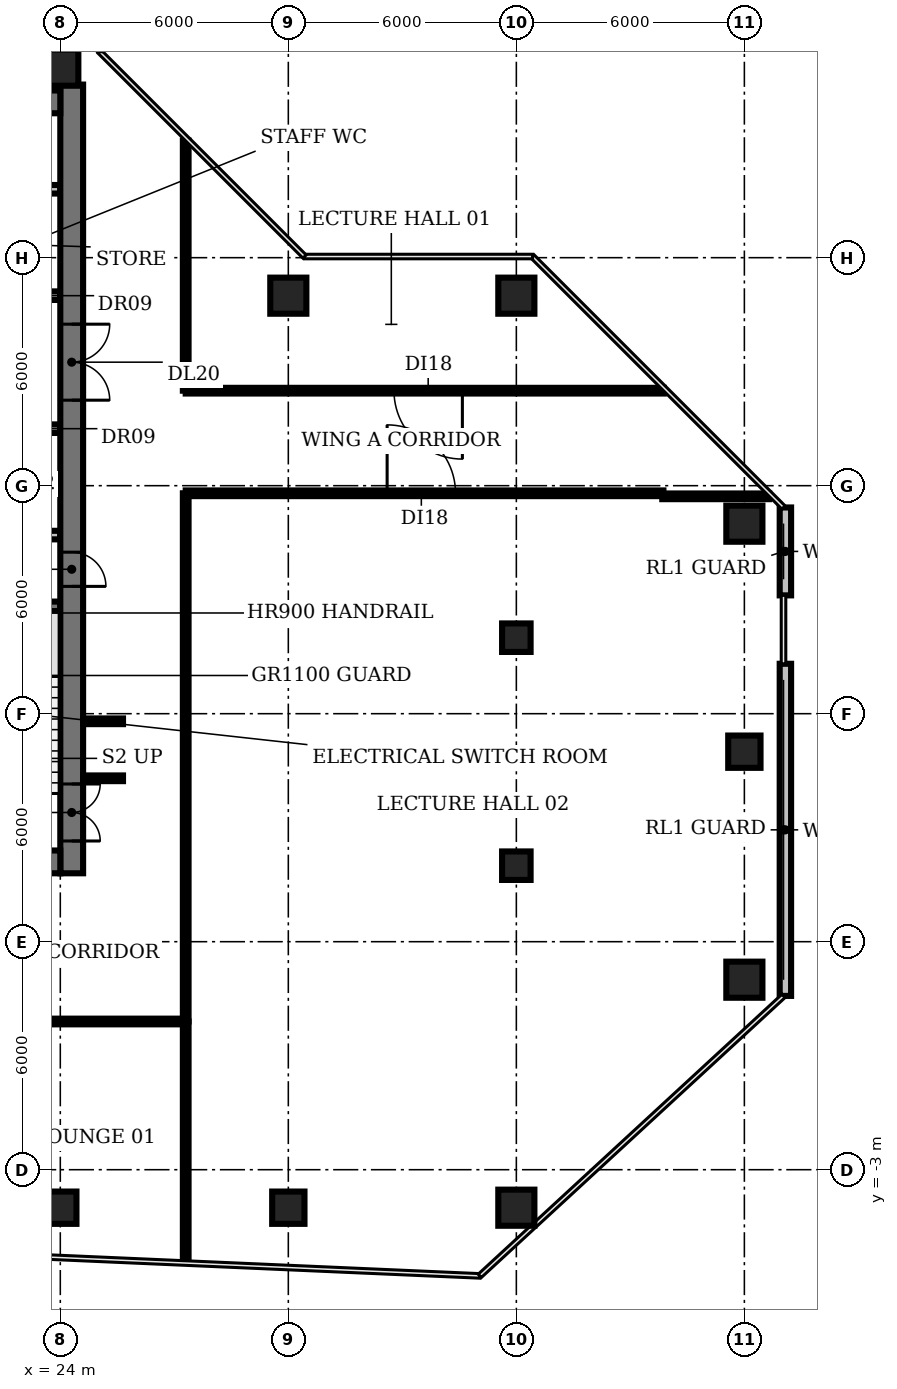
"""IFC4 building model, lengths in metres.
Left out: names, types, materials, properties, quantities, classifications, styles, units other than length and angle.
Written with IfcOpenShell. Run it as: python <this file> out.ifc"""

import sys

from ifc_helpers import new_model, si_unit, direction, frame, frame_2d, origin, origin_2d, place, context, subcontext, project, spatial, rectangle, circle, extrude, element, fill, save


model = new_model("IFC4")
c1 = context("Model", 3, precision=1e-05, world=origin(), true_north=direction((0.0, 1.0)))
c2 = subcontext(c1, "Body", "Model", "MODEL_VIEW")
j1 = project(units=[si_unit("LENGTHUNIT", "METRE"), si_unit("PLANEANGLEUNIT", "RADIAN")], contexts=[c1])
p1 = place(None, origin())
s1 = spatial("IfcSite", under=j1, at=p1, CompositionType="ELEMENT")
p2 = place(p1, origin())
s2 = spatial("IfcBuilding", under=s1, at=p2, CompositionType="ELEMENT")
p3 = place(p2, frame((0.0, 0.0, 159.2)))
s3 = spatial("IfcBuildingStorey", under=s2, at=p3, CompositionType="ELEMENT", Elevation=159.2)
p4 = place(p3, frame((24.0, -4.0, 0.0), z_axis=(0.0, 0.0, 1.0), x_axis=(1.0, 0.0, 0.0)))
e1 = element("IfcColumn", 1, at=p4, inside=s3, PredefinedType="COLUMN", context=c2, shape_type="SweptSolid", body=[
    extrude(rectangle(XDim=0.85, YDim=0.85, at=origin_2d()), origin(), (0.0, 0.0, 1.0), 3.85),
])
p5 = place(p3, frame((24.0, 26.0, 0.0), z_axis=(0.0, 0.0, 1.0), x_axis=(1.0, 0.0, 0.0)))
e2 = element("IfcColumn", 2, at=p5, inside=s3, PredefinedType="COLUMN", context=c2, shape_type="SweptSolid", body=[
    extrude(circle(Radius=0.475, at=origin_2d()), origin(), (0.0, 0.0, 1.0), 3.85),
])
p6 = place(p3, frame((30.0, -4.0, 0.0), z_axis=(0.0, 0.0, 1.0), x_axis=(1.0, 0.0, 0.0)))
e3 = element("IfcColumn", 3, at=p6, inside=s3, PredefinedType="COLUMN", context=c2, shape_type="SweptSolid", body=[
    extrude(rectangle(XDim=0.85, YDim=0.85, at=origin_2d()), origin(), (0.0, 0.0, 1.0), 3.85),
])
for number, where, z_axis, x_axis in (
    (4, (30.0, 20.0, 0.0), (0.0, 0.0, 1.0), (1.0, 0.0, 0.0)),
    (5, (36.0, -4.0, 0.0), (0.0, 0.0, 1.0), (1.0, 0.0, 0.0)),
):
    element("IfcColumn", number, at=place(p3, frame(where, z_axis=z_axis, x_axis=x_axis)), inside=s3, PredefinedType="COLUMN", context=c2, shape_type="SweptSolid", body=[
        extrude(circle(Radius=0.475, at=origin_2d()), origin(), (0.0, 0.0, 1.0), 3.85),
    ])
for number, where, z_axis, x_axis in (
    (6, (36.0, 5.0, 0.0), (0.0, 0.0, 1.0), (1.0, 0.0, 0.0)),
    (7, (36.0, 11.0, 0.0), (0.0, 0.0, 1.0), (1.0, 0.0, 0.0)),
):
    element("IfcColumn", number, at=place(p3, frame(where, z_axis=z_axis, x_axis=x_axis)), inside=s3, PredefinedType="COLUMN", context=c2, shape_type="SweptSolid", body=[
        extrude(rectangle(XDim=0.75, YDim=0.75, at=origin_2d()), origin(), (0.0, 0.0, 1.0), 3.85),
    ])
for number, where, z_axis, x_axis in (
    (8, (36.0, 20.0, 0.0), (0.0, 0.0, 1.0), (1.0, 0.0, 0.0)),
    (9, (42.0, 2.0, 0.0), (0.0, 0.0, 1.0), (1.0, 0.0, 0.0)),
):
    element("IfcColumn", number, at=place(p3, frame(where, z_axis=z_axis, x_axis=x_axis)), inside=s3, PredefinedType="COLUMN", context=c2, shape_type="SweptSolid", body=[
        extrude(circle(Radius=0.475, at=origin_2d()), origin(), (0.0, 0.0, 1.0), 3.85),
    ])
p7 = place(p3, frame((42.0, 8.0, 0.0), z_axis=(0.0, 0.0, 1.0), x_axis=(1.0, 0.0, 0.0)))
e10 = element("IfcColumn", 10, at=p7, inside=s3, PredefinedType="COLUMN", context=c2, shape_type="SweptSolid", body=[
    extrude(rectangle(XDim=0.85, YDim=0.85, at=origin_2d()), origin(), (0.0, 0.0, 1.0), 3.85),
])
p8 = place(p3, frame((42.0, 14.0, 0.0), z_axis=(0.0, 0.0, 1.0), x_axis=(1.0, 0.0, 0.0)))
e11 = element("IfcColumn", 11, at=p8, inside=s3, PredefinedType="COLUMN", context=c2, shape_type="SweptSolid", body=[
    extrude(circle(Radius=0.475, at=origin_2d()), origin(), (0.0, 0.0, 1.0), 3.85),
])
p9 = place(p3, frame((43.08, 1.573, 0.0), z_axis=(0.0, 0.0, 1.0), x_axis=(0.0, 1.0, 0.0)))
e12 = element("IfcWall", 12, at=p9, inside=s3, PredefinedType="SOLIDWALL", context=c2, shape_type="SweptSolid", body=[
    extrude(rectangle(XDim=8.74, YDim=0.3, at=frame_2d((4.37, 0.0))), origin(), (0.0, 0.0, 1.0), 3.85),
])
p10 = place(p3, frame((43.08, 12.113, 0.0), z_axis=(0.0, 0.0, 1.0), x_axis=(0.0, 1.0, 0.0)))
e13 = element("IfcWall", 13, at=p10, inside=s3, PredefinedType="SOLIDWALL", context=c2, shape_type="SweptSolid", body=[
    extrude(rectangle(XDim=2.313, YDim=0.3, at=frame_2d((1.157, 0.0))), origin(), (0.0, 0.0, 1.0), 3.85),
])
p11 = place(p3, frame((20.85, 11.825, 0.0), z_axis=(0.0, 0.0, 1.0), x_axis=(1.0, 0.0, 0.0)))
e14 = element("IfcWall", 14, at=p11, inside=s3, PredefinedType="SHEAR", context=c2, shape_type="SweptSolid", body=[
    extrude(rectangle(XDim=3.15, YDim=0.25, at=frame_2d((1.575, 0.0))), origin(), (0.0, 0.0, 1.0), 3.85),
])
p12 = place(p3, frame((16.6, 13.7, 0.0), z_axis=(0.0, 0.0, 1.0), x_axis=(1.0, 0.0, 0.0)))
e15 = element("IfcWall", 15, at=p12, inside=s3, PredefinedType="PARTITIONING", context=c2, shape_type="SweptSolid", body=[
    extrude(rectangle(XDim=7.4, YDim=0.225, at=frame_2d((3.7, 0.0))), origin(), (0.0, 0.0, 1.0), 3.85),
])
p13 = place(p3, frame((9.4, 16.5, 0.0), z_axis=(0.0, 0.0, 1.0), x_axis=(1.0, 0.0, 0.0)))
e16 = element("IfcWall", 16, at=p13, inside=s3, PredefinedType="PARTITIONING", context=c2, shape_type="SweptSolid", body=[
    extrude(rectangle(XDim=14.6, YDim=0.225, at=frame_2d((7.3, 0.0))), origin(), (0.0, 0.0, 1.0), 3.85),
])
p14 = place(p13, frame((0.85, 0.0, 0.0)))
e17 = element("IfcOpeningElement", 17, at=p14, cuts=e16, PredefinedType="OPENING", context=c2, shape_type="SweptSolid", body=[
    extrude(rectangle(XDim=0.9, YDim=2.1, at=frame_2d((0.45, 1.05))), frame((0.0, 0.123, 0.0), z_axis=(0.0, -1.0, 0.0), x_axis=(1.0, 0.0, 0.0)), (0.0, 0.0, 1.0), 0.245),
])
p15 = place(p13, frame((3.625, 0.0, 0.0)))
e18 = element("IfcOpeningElement", 18, at=p15, cuts=e16, PredefinedType="OPENING", context=c2, shape_type="SweptSolid", body=[
    extrude(rectangle(XDim=0.9, YDim=2.1, at=frame_2d((0.45, 1.05))), frame((0.0, 0.123, 0.0), z_axis=(0.0, -1.0, 0.0), x_axis=(1.0, 0.0, 0.0)), (0.0, 0.0, 1.0), 0.245),
])
p16 = place(p13, frame((7.775, 0.0, 0.0)))
e19 = element("IfcOpeningElement", 19, at=p16, cuts=e16, PredefinedType="OPENING", context=c2, shape_type="SweptSolid", body=[
    extrude(rectangle(XDim=1.0, YDim=2.1, at=frame_2d((0.5, 1.05))), frame((0.0, 0.123, 0.0), z_axis=(0.0, -1.0, 0.0), x_axis=(1.0, 0.0, 0.0)), (0.0, 0.0, 1.0), 0.245),
])
p17 = place(p13, frame((11.647, 0.0, 0.0)))
e20 = element("IfcOpeningElement", 20, at=p17, cuts=e16, PredefinedType="OPENING", context=c2, shape_type="SweptSolid", body=[
    extrude(rectangle(XDim=0.9, YDim=2.1, at=frame_2d((0.45, 1.05))), frame((0.0, 0.123, 0.0), z_axis=(0.0, -1.0, 0.0), x_axis=(1.0, 0.0, 0.0)), (0.0, 0.0, 1.0), 0.245),
])
p18 = place(p13, frame((13.423, 0.0, 0.0)))
e21 = element("IfcOpeningElement", 21, at=p18, cuts=e16, PredefinedType="OPENING", context=c2, shape_type="SweptSolid", body=[
    extrude(rectangle(XDim=0.9, YDim=2.1, at=frame_2d((0.45, 1.05))), frame((0.0, 0.123, 0.0), z_axis=(0.0, -1.0, 0.0), x_axis=(1.0, 0.0, 0.0)), (0.0, 0.0, 1.0), 0.245),
])
p19 = place(p3, frame((24.0, 20.0, 0.0), z_axis=(0.0, 0.0, 1.0), x_axis=(-1.0, 0.0, 0.0)))
e22 = element("IfcWall", 22, at=p19, inside=s3, PredefinedType="PARTITIONING", context=c2, shape_type="SweptSolid", body=[
    extrude(rectangle(XDim=14.6, YDim=0.225, at=frame_2d((7.3, 0.0))), origin(), (0.0, 0.0, 1.0), 3.85),
])
p20 = place(p19, frame((12.75, 0.0, 0.0)))
e23 = element("IfcOpeningElement", 23, at=p20, cuts=e22, PredefinedType="OPENING", context=c2, shape_type="SweptSolid", body=[
    extrude(rectangle(XDim=1.1, YDim=2.1, at=frame_2d((0.55, 1.05))), frame((0.0, 0.123, 0.0), z_axis=(0.0, -1.0, 0.0), x_axis=(1.0, 0.0, 0.0)), (0.0, 0.0, 1.0), 0.245),
])
p21 = place(p19, frame((9.95, 0.0, 0.0)))
e24 = element("IfcOpeningElement", 24, at=p21, cuts=e22, PredefinedType="OPENING", context=c2, shape_type="SweptSolid", body=[
    extrude(rectangle(XDim=1.1, YDim=2.1, at=frame_2d((0.55, 1.05))), frame((0.0, 0.123, 0.0), z_axis=(0.0, -1.0, 0.0), x_axis=(1.0, 0.0, 0.0)), (0.0, 0.0, 1.0), 0.245),
])
p22 = place(p19, frame((7.15, 0.0, 0.0)))
e25 = element("IfcOpeningElement", 25, at=p22, cuts=e22, PredefinedType="OPENING", context=c2, shape_type="SweptSolid", body=[
    extrude(rectangle(XDim=1.1, YDim=2.1, at=frame_2d((0.55, 1.05))), frame((0.0, 0.123, 0.0), z_axis=(0.0, -1.0, 0.0), x_axis=(1.0, 0.0, 0.0)), (0.0, 0.0, 1.0), 0.245),
])
p23 = place(p19, frame((4.35, 0.0, 0.0)))
e26 = element("IfcOpeningElement", 26, at=p23, cuts=e22, PredefinedType="OPENING", context=c2, shape_type="SweptSolid", body=[
    extrude(rectangle(XDim=1.1, YDim=2.1, at=frame_2d((0.55, 1.05))), frame((0.0, 0.123, 0.0), z_axis=(0.0, -1.0, 0.0), x_axis=(1.0, 0.0, 0.0)), (0.0, 0.0, 1.0), 0.245),
])
p24 = place(p19, frame((2.137, 0.0, 0.0)))
e27 = element("IfcOpeningElement", 27, at=p24, cuts=e22, PredefinedType="OPENING", context=c2, shape_type="SweptSolid", body=[
    extrude(rectangle(XDim=0.9, YDim=2.1, at=frame_2d((0.45, 1.05))), frame((0.0, 0.123, 0.0), z_axis=(0.0, -1.0, 0.0), x_axis=(1.0, 0.0, 0.0)), (0.0, 0.0, 1.0), 0.245),
])
p25 = place(p19, frame((0.363, 0.0, 0.0)))
e28 = element("IfcOpeningElement", 28, at=p25, cuts=e22, PredefinedType="OPENING", context=c2, shape_type="SweptSolid", body=[
    extrude(rectangle(XDim=0.9, YDim=2.1, at=frame_2d((0.45, 1.05))), frame((0.0, 0.123, 0.0), z_axis=(0.0, -1.0, 0.0), x_axis=(1.0, 0.0, 0.0)), (0.0, 0.0, 1.0), 0.245),
])
p26 = place(p3, frame((9.4, 22.8, 0.0), z_axis=(0.0, 0.0, 1.0), x_axis=(1.0, 0.0, 0.0)))
e29 = element("IfcWall", 29, at=p26, inside=s3, PredefinedType="PARTITIONING", context=c2, shape_type="SweptSolid", body=[
    extrude(rectangle(XDim=14.6, YDim=0.225, at=frame_2d((7.3, 0.0))), origin(), (0.0, 0.0, 1.0), 3.85),
])
p27 = place(p3, frame((24.3, 25.555, 0.0), z_axis=(0.0, 0.0, 1.0), x_axis=(0.0, -1.0, 0.0)))
e30 = element("IfcWall", 30, at=p27, inside=s3, PredefinedType="SHEAR", context=c2, shape_type="SweptSolid", body=[
    extrude(rectangle(XDim=20.755, YDim=0.6, at=frame_2d((10.377, 0.0))), origin(), (0.0, 0.0, 1.0), 3.85),
])
p28 = place(p27, frame((18.405, 0.0, 0.0)))
e31 = element("IfcOpeningElement", 31, at=p28, cuts=e30, PredefinedType="OPENING", context=c2, shape_type="SweptSolid", body=[
    extrude(rectangle(XDim=1.5, YDim=2.1, at=frame_2d((0.75, 1.05))), frame((0.0, 0.31, 0.0), z_axis=(0.0, -1.0, 0.0), x_axis=(1.0, 0.0, 0.0)), (0.0, 0.0, 1.0), 0.62),
])
p29 = place(p27, frame((12.305, 0.0, 0.0)))
e32 = element("IfcOpeningElement", 32, at=p29, cuts=e30, PredefinedType="OPENING", context=c2, shape_type="SweptSolid", body=[
    extrude(rectangle(XDim=0.9, YDim=2.1, at=frame_2d((0.45, 1.05))), frame((0.0, 0.31, 0.0), z_axis=(0.0, -1.0, 0.0), x_axis=(1.0, 0.0, 0.0)), (0.0, 0.0, 1.0), 0.62),
])
p30 = place(p27, frame((6.305, 0.0, 0.0)))
e33 = element("IfcOpeningElement", 33, at=p30, cuts=e30, PredefinedType="OPENING", context=c2, shape_type="SweptSolid", body=[
    extrude(rectangle(XDim=2.0, YDim=2.1, at=frame_2d((1.0, 1.05))), frame((0.0, 0.31, 0.0), z_axis=(0.0, -1.0, 0.0), x_axis=(1.0, 0.0, 0.0)), (0.0, 0.0, 1.0), 0.62),
])
p31 = place(p3, frame((24.0, 5.1, 0.0), z_axis=(0.0, 0.0, 1.0), x_axis=(-1.0, 0.0, 0.0)))
e34 = element("IfcWall", 34, at=p31, inside=s3, PredefinedType="SHEAR", context=c2, shape_type="SweptSolid", body=[
    extrude(rectangle(XDim=18.0, YDim=0.6, at=frame_2d((9.0, 0.0))), origin(), (0.0, 0.0, 1.0), 3.85),
])
p32 = place(p31, frame((13.0, 0.0, 0.0)))
e35 = element("IfcOpeningElement", 35, at=p32, cuts=e34, PredefinedType="OPENING", context=c2, shape_type="SweptSolid", body=[
    extrude(rectangle(XDim=1.2, YDim=2.1, at=frame_2d((0.6, 1.05))), frame((0.0, 0.31, 0.0), z_axis=(0.0, -1.0, 0.0), x_axis=(1.0, 0.0, 0.0)), (0.0, 0.0, 1.0), 0.62),
])
p33 = place(p31, frame((4.9, 0.0, 0.0)))
e36 = element("IfcOpeningElement", 36, at=p33, cuts=e34, PredefinedType="OPENING", context=c2, shape_type="SweptSolid", body=[
    extrude(rectangle(XDim=1.0, YDim=2.1, at=frame_2d((0.5, 1.05))), frame((0.0, 0.31, 0.0), z_axis=(0.0, -1.0, 0.0), x_axis=(1.0, 0.0, 0.0)), (0.0, 0.0, 1.0), 0.62),
])
p34 = place(p3, frame((6.0, 25.1, 0.0), z_axis=(0.0, 0.0, 1.0), x_axis=(1.0, 0.0, 0.0)))
e37 = element("IfcWall", 37, at=p34, inside=s3, PredefinedType="SHEAR", context=c2, shape_type="SweptSolid", body=[
    extrude(rectangle(XDim=18.0, YDim=0.6, at=frame_2d((9.0, 0.0))), origin(), (0.0, 0.0, 1.0), 3.85),
])
for number, where, z_axis, x_axis in (
    (38, (24.6, 7.3, 0.0), (0.0, 0.0, 1.0), (1.0, 0.0, 0.0)),
    (39, (24.6, 8.8, 0.0), (0.0, 0.0, 1.0), (1.0, 0.0, 0.0)),
):
    element("IfcWall", number, at=place(p3, frame(where, z_axis=z_axis, x_axis=x_axis)), inside=s3, PredefinedType="PARTITIONING", context=c2, shape_type="SweptSolid", body=[
        extrude(rectangle(XDim=1.05, YDim=0.15, at=frame_2d((0.525, 0.0))), origin(), (0.0, 0.0, 1.0), 2.88),
    ])
p35 = place(p3, frame((27.3, -5.41, 0.0), z_axis=(0.0, 0.0, 1.0), x_axis=(0.0, 1.0, 0.0)))
e40 = element("IfcWall", 40, at=p35, inside=s3, PredefinedType="PARTITIONING", context=c2, shape_type="SweptSolid", body=[
    extrude(rectangle(XDim=6.31, YDim=0.15, at=frame_2d((3.155, 0.0))), origin(), (0.0, 0.0, 1.0), 2.88),
])
p36 = place(p3, frame((27.3, 0.9, 0.0), z_axis=(0.0, 0.0, 1.0), x_axis=(-1.0, 0.0, 0.0)))
e41 = element("IfcWall", 41, at=p36, inside=s3, PredefinedType="PARTITIONING", context=c2, shape_type="SweptSolid", body=[
    extrude(rectangle(XDim=24.6, YDim=0.15, at=frame_2d((12.3, 0.0))), origin(), (0.0, 0.0, 1.0), 2.88),
])
p37 = place(p36, frame((11.8, 0.0, 0.0)))
e42 = element("IfcOpeningElement", 42, at=p37, cuts=e41, PredefinedType="OPENING", context=c2, shape_type="SweptSolid", body=[
    extrude(rectangle(XDim=1.2, YDim=2.1, at=frame_2d((0.6, 1.05))), frame((0.0, 0.085, 0.0), z_axis=(0.0, -1.0, 0.0), x_axis=(1.0, 0.0, 0.0)), (0.0, 0.0, 1.0), 0.17),
])
p38 = place(p3, frame((27.3, 0.9, 0.0), z_axis=(0.0, 0.0, 1.0), x_axis=(0.0, 1.0, 0.0)))
e43 = element("IfcWall", 43, at=p38, inside=s3, PredefinedType="PARTITIONING", context=c2, shape_type="SweptSolid", body=[
    extrude(rectangle(XDim=13.9, YDim=0.15, at=frame_2d((6.95, 0.0))), origin(), (0.0, 0.0, 1.0), 2.88),
])
p39 = place(p3, frame((27.3, 14.8, 0.0), z_axis=(0.0, 0.0, 1.0), x_axis=(1.0, 0.0, 0.0)))
e44 = element("IfcWall", 44, at=p39, inside=s3, PredefinedType="PARTITIONING", context=c2, shape_type="SweptSolid", body=[
    extrude(rectangle(XDim=12.57, YDim=0.15, at=frame_2d((6.285, 0.0))), origin(), (0.0, 0.0, 1.0), 2.88),
])
p40 = place(p39, frame((5.3, 0.0, 0.0)))
e45 = element("IfcOpeningElement", 45, at=p40, cuts=e44, PredefinedType="OPENING", context=c2, shape_type="SweptSolid", body=[
    extrude(rectangle(XDim=1.8, YDim=2.1, at=frame_2d((0.9, 1.05))), frame((0.0, 0.085, 0.0), z_axis=(0.0, -1.0, 0.0), x_axis=(1.0, 0.0, 0.0)), (0.0, 0.0, 1.0), 0.17),
])
p41 = place(p3, frame((27.3, 17.5, 0.0), z_axis=(0.0, 0.0, 1.0), x_axis=(0.0, 1.0, 0.0)))
e46 = element("IfcWall", 46, at=p41, inside=s3, PredefinedType="PARTITIONING", context=c2, shape_type="SweptSolid", body=[
    extrude(rectangle(XDim=6.58, YDim=0.15, at=frame_2d((3.29, 0.0))), origin(), (0.0, 0.0, 1.0), 2.88),
])
p42 = place(p3, frame((39.84, 14.72, 0.0), z_axis=(0.0, 0.0, 1.0), x_axis=(1.0, 0.0, 0.0)))
e47 = element("IfcWall", 47, at=p42, inside=s3, PredefinedType="PARTITIONING", context=c2, shape_type="SweptSolid", body=[
    extrude(rectangle(XDim=2.812, YDim=0.15, at=frame_2d((1.406, 0.0))), origin(), (0.0, 0.0, 1.0), 2.88),
])
p43 = place(p3, frame((39.88, 17.5, 0.0), z_axis=(0.0, 0.0, 1.0), x_axis=(-1.0, 0.0, 0.0)))
e48 = element("IfcWall", 48, at=p43, inside=s3, PredefinedType="PARTITIONING", context=c2, shape_type="SweptSolid", body=[
    extrude(rectangle(XDim=12.58, YDim=0.15, at=frame_2d((6.29, 0.0))), origin(), (0.0, 0.0, 1.0), 2.88),
])
p44 = place(p43, frame((5.3, 0.0, 0.0)))
e49 = element("IfcOpeningElement", 49, at=p44, cuts=e48, PredefinedType="OPENING", context=c2, shape_type="SweptSolid", body=[
    extrude(rectangle(XDim=1.8, YDim=2.1, at=frame_2d((0.9, 1.05))), frame((0.0, 0.085, 0.0), z_axis=(0.0, -1.0, 0.0), x_axis=(1.0, 0.0, 0.0)), (0.0, 0.0, 1.0), 0.17),
])
p45 = place(p28, origin())
e50 = element("IfcDoor", 50, at=p45, inside=s3, OperationType="DOUBLE_DOOR_SINGLE_SWING", PredefinedType="DOOR", context=c2, shape_type="SweptSolid", body=[
    extrude(rectangle(XDim=1.5, YDim=2.1, at=frame_2d((0.75, 1.05))), frame((0.0, 0.025, 0.0), z_axis=(0.0, -1.0, 0.0), x_axis=(1.0, 0.0, 0.0)), (0.0, 0.0, 1.0), 0.05),
])
fill(e31, e50)
p46 = place(p29, origin())
e51 = element("IfcDoor", 51, at=p46, inside=s3, OperationType="SINGLE_SWING_RIGHT", PredefinedType="DOOR", context=c2, shape_type="SweptSolid", body=[
    extrude(rectangle(XDim=0.9, YDim=2.1, at=frame_2d((0.45, 1.05))), frame((0.0, -0.24, 0.0), z_axis=(0.0, -1.0, 0.0), x_axis=(1.0, 0.0, 0.0)), (0.0, 0.0, 1.0), 0.05),
])
fill(e32, e51)
p47 = place(p30, origin())
e52 = element("IfcDoor", 52, at=p47, inside=s3, OperationType="DOUBLE_DOOR_SINGLE_SWING", PredefinedType="DOOR", context=c2, shape_type="SweptSolid", body=[
    extrude(rectangle(XDim=2.0, YDim=2.1, at=frame_2d((1.0, 1.05))), frame((0.0, 0.025, 0.0), z_axis=(0.0, -1.0, 0.0), x_axis=(1.0, 0.0, 0.0)), (0.0, 0.0, 1.0), 0.05),
])
fill(e33, e52)
p48 = place(p40, origin())
e53 = element("IfcDoor", 53, at=p48, inside=s3, OperationType="SINGLE_SWING_LEFT", PredefinedType="DOOR", context=c2, shape_type="SweptSolid", body=[
    extrude(rectangle(XDim=1.8, YDim=2.1, at=frame_2d((0.9, 1.05))), frame((0.0, 0.025, 0.0), z_axis=(0.0, -1.0, 0.0), x_axis=(1.0, 0.0, 0.0)), (0.0, 0.0, 1.0), 0.05),
])
fill(e45, e53)
p49 = place(p44, origin())
e54 = element("IfcDoor", 54, at=p49, inside=s3, OperationType="SINGLE_SWING_LEFT", PredefinedType="DOOR", context=c2, shape_type="SweptSolid", body=[
    extrude(rectangle(XDim=1.8, YDim=2.1, at=frame_2d((0.9, 1.05))), frame((0.0, 0.025, 0.0), z_axis=(0.0, -1.0, 0.0), x_axis=(1.0, 0.0, 0.0)), (0.0, 0.0, 1.0), 0.05),
])
fill(e49, e54)
save(model, sys.argv[1])
